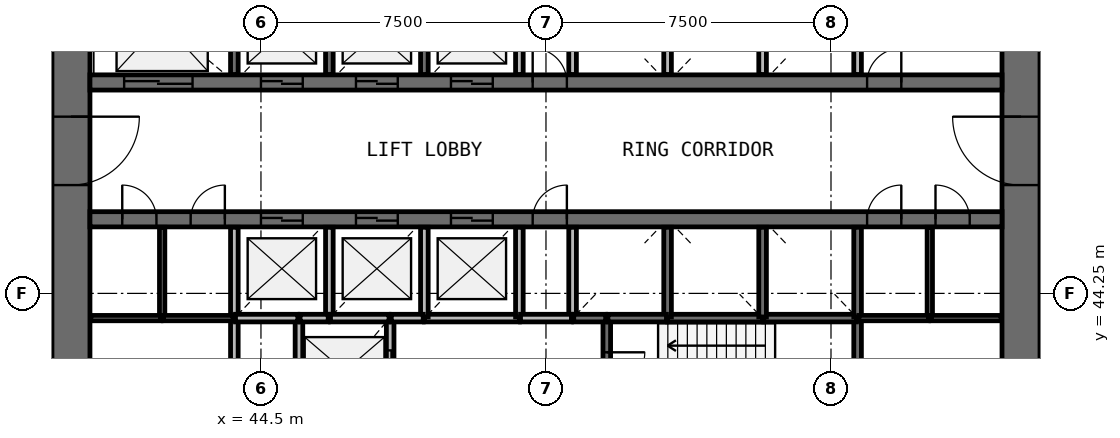
"""IFC4 building model, lengths in metres.
Left out: names, types, materials, properties, quantities, classifications, styles, units other than length and angle.
Written with IfcOpenShell. Run it as: python <this file> out.ifc"""

import sys

from ifc_helpers import new_model, si_unit, direction, frame, frame_2d, origin, place, context, subcontext, project, spatial, rectangle, extrude, source, transform, mapped, element, fill, save


model = new_model("IFC4")
c1 = context("Model", 3, precision=1e-05, world=origin(), true_north=direction((0.0, 1.0)))
c2 = subcontext(c1, "Body", "Model", "MODEL_VIEW")
j1 = project(units=[si_unit("LENGTHUNIT", "METRE"), si_unit("PLANEANGLEUNIT", "RADIAN")], contexts=[c1])
p1 = place(None, origin())
s1 = spatial("IfcSite", under=j1, at=p1, CompositionType="ELEMENT")
p2 = place(p1, origin())
s2 = spatial("IfcBuilding", under=s1, at=p2, CompositionType="ELEMENT")
p3 = place(p2, frame((0.0, 0.0, 5.0)))
s3 = spatial("IfcBuildingStorey", under=s2, at=p3, CompositionType="ELEMENT", Elevation=5.0)
p4 = place(p3, frame((64.5, 38.0, 0.0), z_axis=(0.0, 0.0, 1.0), x_axis=(0.0, 1.0, 0.0)))
e1 = element("IfcWall", 1, at=p4, inside=s3, PredefinedType="SHEAR", context=c2, shape_type="SweptSolid", body=[
    extrude(rectangle(XDim=20.0, YDim=1.0, at=frame_2d((10.0, 0.0))), origin(), (0.0, 0.0, 1.0), 4.4),
])
p5 = place(p4, frame((9.1, 0.0, 0.0)))
e2 = element("IfcOpeningElement", 2, at=p5, cuts=e1, PredefinedType="OPENING", context=c2, shape_type="SweptSolid", body=[
    extrude(rectangle(XDim=1.8, YDim=2.1, at=frame_2d((0.9, 1.05))), frame((0.0, 0.51, 0.0), z_axis=(0.0, -1.0, 0.0), x_axis=(1.0, 0.0, 0.0)), (0.0, 0.0, 1.0), 1.02),
])
p6 = place(p3, frame((39.5, 58.0, 0.0), z_axis=(0.0, 0.0, 1.0), x_axis=(0.0, -1.0, 0.0)))
e3 = element("IfcWall", 3, at=p6, inside=s3, PredefinedType="SHEAR", context=c2, shape_type="SweptSolid", body=[
    extrude(rectangle(XDim=20.0, YDim=1.0, at=frame_2d((10.0, 0.0))), origin(), (0.0, 0.0, 1.0), 4.4),
])
p7 = place(p6, frame((9.1, 0.0, 0.0)))
e4 = element("IfcOpeningElement", 4, at=p7, cuts=e3, PredefinedType="OPENING", context=c2, shape_type="SweptSolid", body=[
    extrude(rectangle(XDim=1.8, YDim=2.1, at=frame_2d((0.9, 1.05))), frame((0.0, 0.51, 0.0), z_axis=(0.0, -1.0, 0.0), x_axis=(1.0, 0.0, 0.0)), (0.0, 0.0, 1.0), 1.02),
])
p8 = place(p3, frame((40.0, 49.8, 0.0), z_axis=(0.0, 0.0, 1.0), x_axis=(1.0, 0.0, 0.0)))
e5 = element("IfcWall", 5, at=p8, inside=s3, PredefinedType="SHEAR", context=c2, shape_type="SweptSolid", body=[
    extrude(rectangle(XDim=24.0, YDim=0.4, at=frame_2d((12.0, 0.0))), origin(), (0.0, 0.0, 1.0), 4.4),
])
p9 = place(p8, frame((4.5, 0.0, 0.0)))
e6 = element("IfcOpeningElement", 6, at=p9, cuts=e5, PredefinedType="OPENING", context=c2, shape_type="SweptSolid", body=[
    extrude(rectangle(XDim=1.1, YDim=2.1, at=frame_2d((0.55, 1.05))), frame((0.0, 0.21, 0.0), z_axis=(0.0, -1.0, 0.0), x_axis=(1.0, 0.0, 0.0)), (0.0, 0.0, 1.0), 0.42),
])
p10 = place(p8, frame((7.0, 0.0, 0.0)))
e7 = element("IfcOpeningElement", 7, at=p10, cuts=e5, PredefinedType="OPENING", context=c2, shape_type="SweptSolid", body=[
    extrude(rectangle(XDim=1.1, YDim=2.1, at=frame_2d((0.55, 1.05))), frame((0.0, 0.21, 0.0), z_axis=(0.0, -1.0, 0.0), x_axis=(1.0, 0.0, 0.0)), (0.0, 0.0, 1.0), 0.42),
])
p11 = place(p8, frame((9.5, 0.0, 0.0)))
e8 = element("IfcOpeningElement", 8, at=p11, cuts=e5, PredefinedType="OPENING", context=c2, shape_type="SweptSolid", body=[
    extrude(rectangle(XDim=1.1, YDim=2.1, at=frame_2d((0.55, 1.05))), frame((0.0, 0.21, 0.0), z_axis=(0.0, -1.0, 0.0), x_axis=(1.0, 0.0, 0.0)), (0.0, 0.0, 1.0), 0.42),
])
p12 = place(p8, frame((0.9, 0.0, 0.0)))
e9 = element("IfcOpeningElement", 9, at=p12, cuts=e5, PredefinedType="OPENING", context=c2, shape_type="SweptSolid", body=[
    extrude(rectangle(XDim=1.8, YDim=2.4, at=frame_2d((0.9, 1.2))), frame((0.0, 0.21, 0.0), z_axis=(0.0, -1.0, 0.0), x_axis=(1.0, 0.0, 0.0)), (0.0, 0.0, 1.0), 0.42),
])
p13 = place(p8, frame((20.45, 0.0, 0.0)))
e10 = element("IfcOpeningElement", 10, at=p13, cuts=e5, PredefinedType="OPENING", context=c2, shape_type="SweptSolid", body=[
    extrude(rectangle(XDim=0.9, YDim=2.1, at=frame_2d((0.45, 1.05))), frame((0.0, 0.21, 0.0), z_axis=(0.0, -1.0, 0.0), x_axis=(1.0, 0.0, 0.0)), (0.0, 0.0, 1.0), 0.42),
])
p14 = place(p8, frame((11.65, 0.0, 0.0)))
e11 = element("IfcOpeningElement", 11, at=p14, cuts=e5, PredefinedType="OPENING", context=c2, shape_type="SweptSolid", body=[
    extrude(rectangle(XDim=0.9, YDim=2.1, at=frame_2d((0.45, 1.05))), frame((0.0, 0.21, 0.0), z_axis=(0.0, -1.0, 0.0), x_axis=(1.0, 0.0, 0.0)), (0.0, 0.0, 1.0), 0.42),
])
p15 = place(p3, frame((40.0, 46.2, 0.0), z_axis=(0.0, 0.0, 1.0), x_axis=(1.0, 0.0, 0.0)))
e12 = element("IfcWall", 12, at=p15, inside=s3, PredefinedType="SHEAR", context=c2, shape_type="SweptSolid", body=[
    extrude(rectangle(XDim=24.0, YDim=0.4, at=frame_2d((12.0, 0.0))), origin(), (0.0, 0.0, 1.0), 4.4),
])
p16 = place(p15, frame((4.5, 0.0, 0.0)))
e13 = element("IfcOpeningElement", 13, at=p16, cuts=e12, PredefinedType="OPENING", context=c2, shape_type="SweptSolid", body=[
    extrude(rectangle(XDim=1.1, YDim=2.1, at=frame_2d((0.55, 1.05))), frame((0.0, 0.21, 0.0), z_axis=(0.0, -1.0, 0.0), x_axis=(1.0, 0.0, 0.0)), (0.0, 0.0, 1.0), 0.42),
])
p17 = place(p15, frame((7.0, 0.0, 0.0)))
e14 = element("IfcOpeningElement", 14, at=p17, cuts=e12, PredefinedType="OPENING", context=c2, shape_type="SweptSolid", body=[
    extrude(rectangle(XDim=1.1, YDim=2.1, at=frame_2d((0.55, 1.05))), frame((0.0, 0.21, 0.0), z_axis=(0.0, -1.0, 0.0), x_axis=(1.0, 0.0, 0.0)), (0.0, 0.0, 1.0), 0.42),
])
p18 = place(p15, frame((9.5, 0.0, 0.0)))
e15 = element("IfcOpeningElement", 15, at=p18, cuts=e12, PredefinedType="OPENING", context=c2, shape_type="SweptSolid", body=[
    extrude(rectangle(XDim=1.1, YDim=2.1, at=frame_2d((0.55, 1.05))), frame((0.0, 0.21, 0.0), z_axis=(0.0, -1.0, 0.0), x_axis=(1.0, 0.0, 0.0)), (0.0, 0.0, 1.0), 0.42),
])
p19 = place(p15, frame((20.45, 0.0, 0.0)))
e16 = element("IfcOpeningElement", 16, at=p19, cuts=e12, PredefinedType="OPENING", context=c2, shape_type="SweptSolid", body=[
    extrude(rectangle(XDim=0.9, YDim=2.1, at=frame_2d((0.45, 1.05))), frame((0.0, 0.21, 0.0), z_axis=(0.0, -1.0, 0.0), x_axis=(1.0, 0.0, 0.0)), (0.0, 0.0, 1.0), 0.42),
])
p20 = place(p15, frame((22.25, 0.0, 0.0)))
e17 = element("IfcOpeningElement", 17, at=p20, cuts=e12, PredefinedType="OPENING", context=c2, shape_type="SweptSolid", body=[
    extrude(rectangle(XDim=0.9, YDim=2.1, at=frame_2d((0.45, 1.05))), frame((0.0, 0.21, 0.0), z_axis=(0.0, -1.0, 0.0), x_axis=(1.0, 0.0, 0.0)), (0.0, 0.0, 1.0), 0.42),
])
p21 = place(p15, frame((0.85, 0.0, 0.0)))
e18 = element("IfcOpeningElement", 18, at=p21, cuts=e12, PredefinedType="OPENING", context=c2, shape_type="SweptSolid", body=[
    extrude(rectangle(XDim=0.9, YDim=2.1, at=frame_2d((0.45, 1.05))), frame((0.0, 0.21, 0.0), z_axis=(0.0, -1.0, 0.0), x_axis=(1.0, 0.0, 0.0)), (0.0, 0.0, 1.0), 0.42),
])
p22 = place(p15, frame((2.65, 0.0, 0.0)))
e19 = element("IfcOpeningElement", 19, at=p22, cuts=e12, PredefinedType="OPENING", context=c2, shape_type="SweptSolid", body=[
    extrude(rectangle(XDim=0.9, YDim=2.1, at=frame_2d((0.45, 1.05))), frame((0.0, 0.21, 0.0), z_axis=(0.0, -1.0, 0.0), x_axis=(1.0, 0.0, 0.0)), (0.0, 0.0, 1.0), 0.42),
])
p23 = place(p15, frame((11.65, 0.0, 0.0)))
e20 = element("IfcOpeningElement", 20, at=p23, cuts=e12, PredefinedType="OPENING", context=c2, shape_type="SweptSolid", body=[
    extrude(rectangle(XDim=0.9, YDim=2.1, at=frame_2d((0.45, 1.05))), frame((0.0, 0.21, 0.0), z_axis=(0.0, -1.0, 0.0), x_axis=(1.0, 0.0, 0.0)), (0.0, 0.0, 1.0), 0.42),
])
for number, where, z_axis, x_axis in (
    (21, (43.8, 43.6, 0.0), (0.0, 0.0, 1.0), (0.0, -1.0, 0.0)),
    (22, (45.5, 43.6, 0.0), (0.0, 0.0, 1.0), (0.0, -1.0, 0.0)),
):
    element("IfcWall", number, at=place(p3, frame(where, z_axis=z_axis, x_axis=x_axis)), inside=s3, PredefinedType="SOLIDWALL", context=c2, shape_type="SweptSolid", body=[
        extrude(rectangle(XDim=2.8, YDim=0.2, at=frame_2d((1.4, 0.0))), origin(), (0.0, 0.0, 1.0), 4.05),
    ])
p24 = place(p3, frame((47.9, 40.83, 0.0), z_axis=(0.0, 0.0, 1.0), x_axis=(0.0, 1.0, 0.0)))
e23 = element("IfcWall", 23, at=p24, inside=s3, PredefinedType="SOLIDWALL", context=c2, shape_type="SweptSolid", body=[
    extrude(rectangle(XDim=2.77, YDim=0.2, at=frame_2d((1.385, 0.0))), origin(), (0.0, 0.0, 1.0), 4.05),
])
p25 = place(p24, frame((0.82, 0.0, 0.0)))
e24 = element("IfcOpeningElement", 24, at=p25, cuts=e23, PredefinedType="OPENING", context=c2, shape_type="SweptSolid", body=[
    extrude(rectangle(XDim=1.1, YDim=2.1, at=frame_2d((0.55, 1.05))), frame((0.0, 0.11, 0.0), z_axis=(0.0, -1.0, 0.0), x_axis=(1.0, 0.0, 0.0)), (0.0, 0.0, 1.0), 0.22),
])
p26 = place(p3, frame((60.2, 40.83, 0.0), z_axis=(0.0, 0.0, 1.0), x_axis=(0.0, 1.0, 0.0)))
e25 = element("IfcWall", 25, at=p26, inside=s3, PredefinedType="SOLIDWALL", context=c2, shape_type="SweptSolid", body=[
    extrude(rectangle(XDim=2.77, YDim=0.2, at=frame_2d((1.385, 0.0))), origin(), (0.0, 0.0, 1.0), 4.05),
])
p27 = place(p3, frame((53.6, 43.6, 0.0), z_axis=(0.0, 0.0, 1.0), x_axis=(0.0, -1.0, 0.0)))
e26 = element("IfcWall", 26, at=p27, inside=s3, PredefinedType="SOLIDWALL", context=c2, shape_type="SweptSolid", body=[
    extrude(rectangle(XDim=2.77, YDim=0.2, at=frame_2d((1.385, 0.0))), origin(), (0.0, 0.0, 1.0), 4.05),
])
p28 = place(p27, frame((0.9, 0.0, 0.0)))
e27 = element("IfcOpeningElement", 27, at=p28, cuts=e26, PredefinedType="OPENING", context=c2, shape_type="SweptSolid", body=[
    extrude(rectangle(XDim=1.0, YDim=2.1, at=frame_2d((0.5, 1.05))), frame((0.0, 0.11, 0.0), z_axis=(0.0, -1.0, 0.0), x_axis=(1.0, 0.0, 0.0)), (0.0, 0.0, 1.0), 0.22),
])
for number, where, z_axis, x_axis in (
    (28, (48.8, 43.6, 0.0), (0.0, 0.0, 1.0), (1.0, 0.0, 0.0)),
    (29, (55.2, 43.6, 0.0), (0.0, 0.0, 1.0), (1.0, 0.0, 0.0)),
):
    element("IfcWall", number, at=place(p3, frame(where, z_axis=z_axis, x_axis=x_axis)), inside=s3, PredefinedType="SOLIDWALL", context=c2, shape_type="SweptSolid", body=[
        extrude(rectangle(XDim=2.5, YDim=0.2, at=frame_2d((1.25, 0.0))), origin(), (0.0, 0.0, 1.0), 4.05),
    ])
p29 = place(p3, frame((57.73, 43.6, 0.0), z_axis=(0.0, 0.0, 1.0), x_axis=(1.0, 0.0, 0.0)))
e30 = element("IfcWall", 30, at=p29, inside=s3, PredefinedType="SOLIDWALL", context=c2, shape_type="SweptSolid", body=[
    extrude(rectangle(XDim=2.44, YDim=0.2, at=frame_2d((1.22, 0.0))), origin(), (0.0, 0.0, 1.0), 4.05),
])
for number, where, z_axis, x_axis in (
    (31, (43.8, 45.99, 0.0), (0.0, 0.0, 1.0), (0.0, -1.0, 0.0)),
    (32, (43.8, 52.37, 0.0), (0.0, 0.0, 1.0), (0.0, -1.0, 0.0)),
):
    element("IfcWall", number, at=place(p3, frame(where, z_axis=z_axis, x_axis=x_axis)), inside=s3, PredefinedType="SOLIDWALL", context=c2, shape_type="SweptSolid", body=[
        extrude(rectangle(XDim=2.36, YDim=0.2, at=frame_2d((1.18, 0.0))), origin(), (0.0, 0.0, 1.0), 4.05),
    ])
p30 = place(p3, frame((46.3, 43.6, 0.0), z_axis=(0.0, 0.0, 1.0), x_axis=(0.0, 1.0, 0.0)))
e33 = element("IfcWall", 33, at=p30, inside=s3, PredefinedType="SOLIDWALL", context=c2, shape_type="SweptSolid", body=[
    extrude(rectangle(XDim=2.39, YDim=0.2, at=frame_2d((1.195, 0.0))), origin(), (0.0, 0.0, 1.0), 4.05),
])
for number, where, z_axis, x_axis in (
    (34, (46.3, 50.01, 0.0), (0.0, 0.0, 1.0), (0.0, 1.0, 0.0)),
    (35, (48.8, 43.63, 0.0), (0.0, 0.0, 1.0), (0.0, 1.0, 0.0)),
    (36, (48.8, 50.01, 0.0), (0.0, 0.0, 1.0), (0.0, 1.0, 0.0)),
    (37, (51.3, 43.63, 0.0), (0.0, 0.0, 1.0), (0.0, 1.0, 0.0)),
):
    element("IfcWall", number, at=place(p3, frame(where, z_axis=z_axis, x_axis=x_axis)), inside=s3, PredefinedType="SOLIDWALL", context=c2, shape_type="SweptSolid", body=[
        extrude(rectangle(XDim=2.36, YDim=0.2, at=frame_2d((1.18, 0.0))), origin(), (0.0, 0.0, 1.0), 4.05),
    ])
for number, where, z_axis, x_axis in (
    (38, (51.3, 50.01, 0.0), (0.0, 0.0, 1.0), (0.0, 1.0, 0.0)),
    (39, (52.7, 45.99, 0.0), (0.0, 0.0, 1.0), (0.0, -1.0, 0.0)),
):
    element("IfcWall", number, at=place(p3, frame(where, z_axis=z_axis, x_axis=x_axis)), inside=s3, PredefinedType="SOLIDWALL", context=c2, shape_type="SweptSolid", body=[
        extrude(rectangle(XDim=2.39, YDim=0.2, at=frame_2d((1.195, 0.0))), origin(), (0.0, 0.0, 1.0), 4.05),
    ])
for number, where, z_axis, x_axis in (
    (40, (52.7, 52.37, 0.0), (0.0, 0.0, 1.0), (0.0, -1.0, 0.0)),
    (41, (55.2, 43.63, 0.0), (0.0, 0.0, 1.0), (0.0, 1.0, 0.0)),
    (42, (55.2, 50.01, 0.0), (0.0, 0.0, 1.0), (0.0, 1.0, 0.0)),
    (43, (57.7, 43.63, 0.0), (0.0, 0.0, 1.0), (0.0, 1.0, 0.0)),
):
    element("IfcWall", number, at=place(p3, frame(where, z_axis=z_axis, x_axis=x_axis)), inside=s3, PredefinedType="SOLIDWALL", context=c2, shape_type="SweptSolid", body=[
        extrude(rectangle(XDim=2.36, YDim=0.2, at=frame_2d((1.18, 0.0))), origin(), (0.0, 0.0, 1.0), 4.05),
    ])
p31 = place(p3, frame((57.7, 50.01, 0.0), z_axis=(0.0, 0.0, 1.0), x_axis=(0.0, 1.0, 0.0)))
e44 = element("IfcWall", 44, at=p31, inside=s3, PredefinedType="SOLIDWALL", context=c2, shape_type="SweptSolid", body=[
    extrude(rectangle(XDim=2.39, YDim=0.2, at=frame_2d((1.195, 0.0))), origin(), (0.0, 0.0, 1.0), 4.05),
])
for number, where, z_axis, x_axis in (
    (45, (60.2, 43.63, 0.0), (0.0, 0.0, 1.0), (0.0, 1.0, 0.0)),
    (46, (60.2, 50.01, 0.0), (0.0, 0.0, 1.0), (0.0, 1.0, 0.0)),
):
    element("IfcWall", number, at=place(p3, frame(where, z_axis=z_axis, x_axis=x_axis)), inside=s3, PredefinedType="SOLIDWALL", context=c2, shape_type="SweptSolid", body=[
        extrude(rectangle(XDim=2.36, YDim=0.2, at=frame_2d((1.18, 0.0))), origin(), (0.0, 0.0, 1.0), 4.05),
    ])
p32 = place(p3, frame((43.83, 43.6, 0.0), z_axis=(0.0, 0.0, 1.0), x_axis=(1.0, 0.0, 0.0)))
e47 = element("IfcWall", 47, at=p32, inside=s3, PredefinedType="SOLIDWALL", context=c2, shape_type="SweptSolid", body=[
    extrude(rectangle(XDim=1.64, YDim=0.2, at=frame_2d((0.82, 0.0))), origin(), (0.0, 0.0, 1.0), 4.05),
])
for number, where, z_axis, x_axis in (
    (48, (46.33, 43.6, 0.0), (0.0, 0.0, 1.0), (1.0, 0.0, 0.0)),
    (49, (53.63, 43.6, 0.0), (0.0, 0.0, 1.0), (1.0, 0.0, 0.0)),
):
    element("IfcWall", number, at=place(p3, frame(where, z_axis=z_axis, x_axis=x_axis)), inside=s3, PredefinedType="SOLIDWALL", context=c2, shape_type="SweptSolid", body=[
        extrude(rectangle(XDim=1.54, YDim=0.2, at=frame_2d((0.77, 0.0))), origin(), (0.0, 0.0, 1.0), 4.05),
    ])
p33 = place(p3, frame((52.67, 43.6, 0.0), z_axis=(0.0, 0.0, 1.0), x_axis=(-1.0, 0.0, 0.0)))
e50 = element("IfcWall", 50, at=p33, inside=s3, PredefinedType="SOLIDWALL", context=c2, shape_type="SweptSolid", body=[
    extrude(rectangle(XDim=1.34, YDim=0.2, at=frame_2d((0.67, 0.0))), origin(), (0.0, 0.0, 1.0), 4.05),
])
for number, where, z_axis, x_axis in (
    (51, (47.93, 43.6, 0.0), (0.0, 0.0, 1.0), (1.0, 0.0, 0.0)),
    (52, (52.73, 43.6, 0.0), (0.0, 0.0, 1.0), (1.0, 0.0, 0.0)),
):
    element("IfcWall", number, at=place(p3, frame(where, z_axis=z_axis, x_axis=x_axis)), inside=s3, PredefinedType="SOLIDWALL", context=c2, shape_type="SweptSolid", body=[
        extrude(rectangle(XDim=0.84, YDim=0.2, at=frame_2d((0.42, 0.0))), origin(), (0.0, 0.0, 1.0), 4.05),
    ])
p34 = place(p3, frame((45.53, 43.6, 0.0), z_axis=(0.0, 0.0, 1.0), x_axis=(1.0, 0.0, 0.0)))
e53 = element("IfcWall", 53, at=p34, inside=s3, PredefinedType="SOLIDWALL", context=c2, shape_type="SweptSolid", body=[
    extrude(rectangle(XDim=0.74, YDim=0.2, at=frame_2d((0.37, 0.0))), origin(), (0.0, 0.0, 1.0), 4.05),
])
for number, where, z_axis, x_axis in (
    (54, (41.9, 43.6, 0.0), (0.0, 0.0, 1.0), (0.0, 1.0, 0.0)),
    (55, (62.1, 43.6, 0.0), (0.0, 0.0, 1.0), (0.0, 1.0, 0.0)),
):
    element("IfcWall", number, at=place(p3, frame(where, z_axis=z_axis, x_axis=x_axis)), inside=s3, PredefinedType="PARTITIONING", context=c2, shape_type="SweptSolid", body=[
        extrude(rectangle(XDim=2.39, YDim=0.14, at=frame_2d((1.195, 0.0))), origin(), (0.0, 0.0, 1.0), 3.25),
    ])
for number, where, z_axis, x_axis in (
    (56, (43.77, 43.6, 0.0), (0.0, 0.0, 1.0), (-1.0, 0.0, 0.0)),
    (57, (60.23, 43.6, 0.0), (0.0, 0.0, 1.0), (1.0, 0.0, 0.0)),
):
    element("IfcWall", number, at=place(p3, frame(where, z_axis=z_axis, x_axis=x_axis)), inside=s3, PredefinedType="PARTITIONING", context=c2, shape_type="SweptSolid", body=[
        extrude(rectangle(XDim=1.84, YDim=0.14, at=frame_2d((0.92, 0.0))), origin(), (0.0, 0.0, 1.0), 3.25),
    ])
for number, where, z_axis, x_axis in (
    (58, (41.87, 43.6, 0.0), (0.0, 0.0, 1.0), (-1.0, 0.0, 0.0)),
    (59, (62.13, 43.6, 0.0), (0.0, 0.0, 1.0), (1.0, 0.0, 0.0)),
):
    element("IfcWall", number, at=place(p3, frame(where, z_axis=z_axis, x_axis=x_axis)), inside=s3, PredefinedType="PARTITIONING", context=c2, shape_type="SweptSolid", body=[
        extrude(rectangle(XDim=1.85, YDim=0.14, at=frame_2d((0.925, 0.0))), origin(), (0.0, 0.0, 1.0), 3.25),
    ])
m1 = source(origin(), c2, "Body", "SweptSolid", [
    extrude(rectangle(XDim=1.8, YDim=2.1, at=frame_2d((0.9, 1.05))), frame((0.0, 0.025, 0.0), z_axis=(0.0, -1.0, 0.0), x_axis=(1.0, 0.0, 0.0)), (0.0, 0.0, 1.0), 0.05),
])
p35 = place(p7, origin())
e60 = element("IfcDoor", 60, at=p35, inside=s3, OperationType="SINGLE_SWING_LEFT", PredefinedType="DOOR", context=c2, shape_type="MappedRepresentation", body=[
    mapped(m1, transform((0.0, 0.0, 0.0), scale=1.0)),
])
fill(e4, e60)
p36 = place(p5, origin())
e61 = element("IfcDoor", 61, at=p36, inside=s3, OperationType="SINGLE_SWING_RIGHT", PredefinedType="DOOR", context=c2, shape_type="MappedRepresentation", body=[
    mapped(m1, transform((0.0, 0.0, 0.0), scale=1.0)),
])
fill(e2, e61)
m2 = source(origin(), c2, "Body", "SweptSolid", [
    extrude(rectangle(XDim=1.1, YDim=2.1, at=frame_2d((0.55, 1.05))), frame((0.0, 0.025, 0.0), z_axis=(0.0, -1.0, 0.0), x_axis=(1.0, 0.0, 0.0)), (0.0, 0.0, 1.0), 0.05),
])
p37 = place(p9, origin())
e62 = element("IfcDoor", 62, at=p37, inside=s3, OperationType="DOUBLE_DOOR_SLIDING", PredefinedType="USERDEFINED", context=c2, shape_type="MappedRepresentation", body=[
    mapped(m2, transform((0.0, 0.0, 0.0), scale=1.0)),
])
fill(e6, e62)
p38 = place(p10, origin())
e63 = element("IfcDoor", 63, at=p38, inside=s3, OperationType="DOUBLE_DOOR_SLIDING", PredefinedType="USERDEFINED", context=c2, shape_type="MappedRepresentation", body=[
    mapped(m2, transform((0.0, 0.0, 0.0), scale=1.0)),
])
fill(e7, e63)
p39 = place(p11, origin())
e64 = element("IfcDoor", 64, at=p39, inside=s3, OperationType="DOUBLE_DOOR_SLIDING", PredefinedType="USERDEFINED", context=c2, shape_type="MappedRepresentation", body=[
    mapped(m2, transform((0.0, 0.0, 0.0), scale=1.0)),
])
fill(e8, e64)
p40 = place(p16, origin())
e65 = element("IfcDoor", 65, at=p40, inside=s3, OperationType="DOUBLE_DOOR_SLIDING", PredefinedType="USERDEFINED", context=c2, shape_type="MappedRepresentation", body=[
    mapped(m2, transform((0.0, 0.0, 0.0), scale=1.0)),
])
fill(e13, e65)
p41 = place(p17, origin())
e66 = element("IfcDoor", 66, at=p41, inside=s3, OperationType="DOUBLE_DOOR_SLIDING", PredefinedType="USERDEFINED", context=c2, shape_type="MappedRepresentation", body=[
    mapped(m2, transform((0.0, 0.0, 0.0), scale=1.0)),
])
fill(e14, e66)
p42 = place(p18, origin())
e67 = element("IfcDoor", 67, at=p42, inside=s3, OperationType="DOUBLE_DOOR_SLIDING", PredefinedType="USERDEFINED", context=c2, shape_type="MappedRepresentation", body=[
    mapped(m2, transform((0.0, 0.0, 0.0), scale=1.0)),
])
fill(e15, e67)
p43 = place(p25, origin())
e68 = element("IfcDoor", 68, at=p43, inside=s3, OperationType="DOUBLE_DOOR_SLIDING", PredefinedType="USERDEFINED", context=c2, shape_type="MappedRepresentation", body=[
    mapped(m2, transform((0.0, 0.0, 0.0), scale=1.0)),
])
fill(e24, e68)
m3 = source(origin(), c2, "Body", "SweptSolid", [
    extrude(rectangle(XDim=1.8, YDim=2.4, at=frame_2d((0.9, 1.2))), frame((0.0, 0.025, 0.0), z_axis=(0.0, -1.0, 0.0), x_axis=(1.0, 0.0, 0.0)), (0.0, 0.0, 1.0), 0.05),
])
p44 = place(p12, origin())
e69 = element("IfcDoor", 69, at=p44, inside=s3, OperationType="DOUBLE_DOOR_SLIDING", PredefinedType="USERDEFINED", context=c2, shape_type="MappedRepresentation", body=[
    mapped(m3, transform((0.0, 0.0, 0.0), scale=1.0)),
])
fill(e9, e69)
m4 = source(origin(), c2, "Body", "SweptSolid", [
    extrude(rectangle(XDim=1.0, YDim=2.1, at=frame_2d((0.5, 1.05))), frame((0.0, 0.025, 0.0), z_axis=(0.0, -1.0, 0.0), x_axis=(1.0, 0.0, 0.0)), (0.0, 0.0, 1.0), 0.05),
])
p45 = place(p28, origin())
e70 = element("IfcDoor", 70, at=p45, inside=s3, OperationType="SINGLE_SWING_LEFT", PredefinedType="DOOR", context=c2, shape_type="MappedRepresentation", body=[
    mapped(m4, transform((0.0, 0.0, 0.0), scale=1.0)),
])
fill(e27, e70)
m5 = source(origin(), c2, "Body", "SweptSolid", [
    extrude(rectangle(XDim=0.9, YDim=2.1, at=frame_2d((0.45, 1.05))), frame((0.0, 0.025, 0.0), z_axis=(0.0, -1.0, 0.0), x_axis=(1.0, 0.0, 0.0)), (0.0, 0.0, 1.0), 0.05),
])
p46 = place(p19, origin())
e71 = element("IfcDoor", 71, at=p46, inside=s3, OperationType="SINGLE_SWING_RIGHT", PredefinedType="DOOR", context=c2, shape_type="MappedRepresentation", body=[
    mapped(m5, transform((0.0, 0.0, 0.0), scale=1.0)),
])
fill(e16, e71)
p47 = place(p20, origin())
e72 = element("IfcDoor", 72, at=p47, inside=s3, OperationType="SINGLE_SWING_LEFT", PredefinedType="DOOR", context=c2, shape_type="MappedRepresentation", body=[
    mapped(m5, transform((0.0, 0.0, 0.0), scale=1.0)),
])
fill(e17, e72)
p48 = place(p13, origin())
e73 = element("IfcDoor", 73, at=p48, inside=s3, OperationType="SINGLE_SWING_RIGHT", PredefinedType="DOOR", context=c2, shape_type="MappedRepresentation", body=[
    mapped(m5, transform((0.0, 0.0, 0.0), scale=1.0)),
])
fill(e10, e73)
p49 = place(p21, origin())
e74 = element("IfcDoor", 74, at=p49, inside=s3, OperationType="SINGLE_SWING_LEFT", PredefinedType="DOOR", context=c2, shape_type="MappedRepresentation", body=[
    mapped(m5, transform((0.0, 0.0, 0.0), scale=1.0)),
])
fill(e18, e74)
p50 = place(p22, origin())
e75 = element("IfcDoor", 75, at=p50, inside=s3, OperationType="SINGLE_SWING_RIGHT", PredefinedType="DOOR", context=c2, shape_type="MappedRepresentation", body=[
    mapped(m5, transform((0.0, 0.0, 0.0), scale=1.0)),
])
fill(e19, e75)
p51 = place(p14, origin())
e76 = element("IfcDoor", 76, at=p51, inside=s3, OperationType="SINGLE_SWING_LEFT", PredefinedType="DOOR", context=c2, shape_type="MappedRepresentation", body=[
    mapped(m5, transform((0.0, 0.0, 0.0), scale=1.0)),
])
fill(e11, e76)
p52 = place(p23, origin())
e77 = element("IfcDoor", 77, at=p52, inside=s3, OperationType="SINGLE_SWING_RIGHT", PredefinedType="DOOR", context=c2, shape_type="MappedRepresentation", body=[
    mapped(m5, transform((0.0, 0.0, 0.0), scale=1.0)),
])
fill(e20, e77)
save(model, sys.argv[1])
